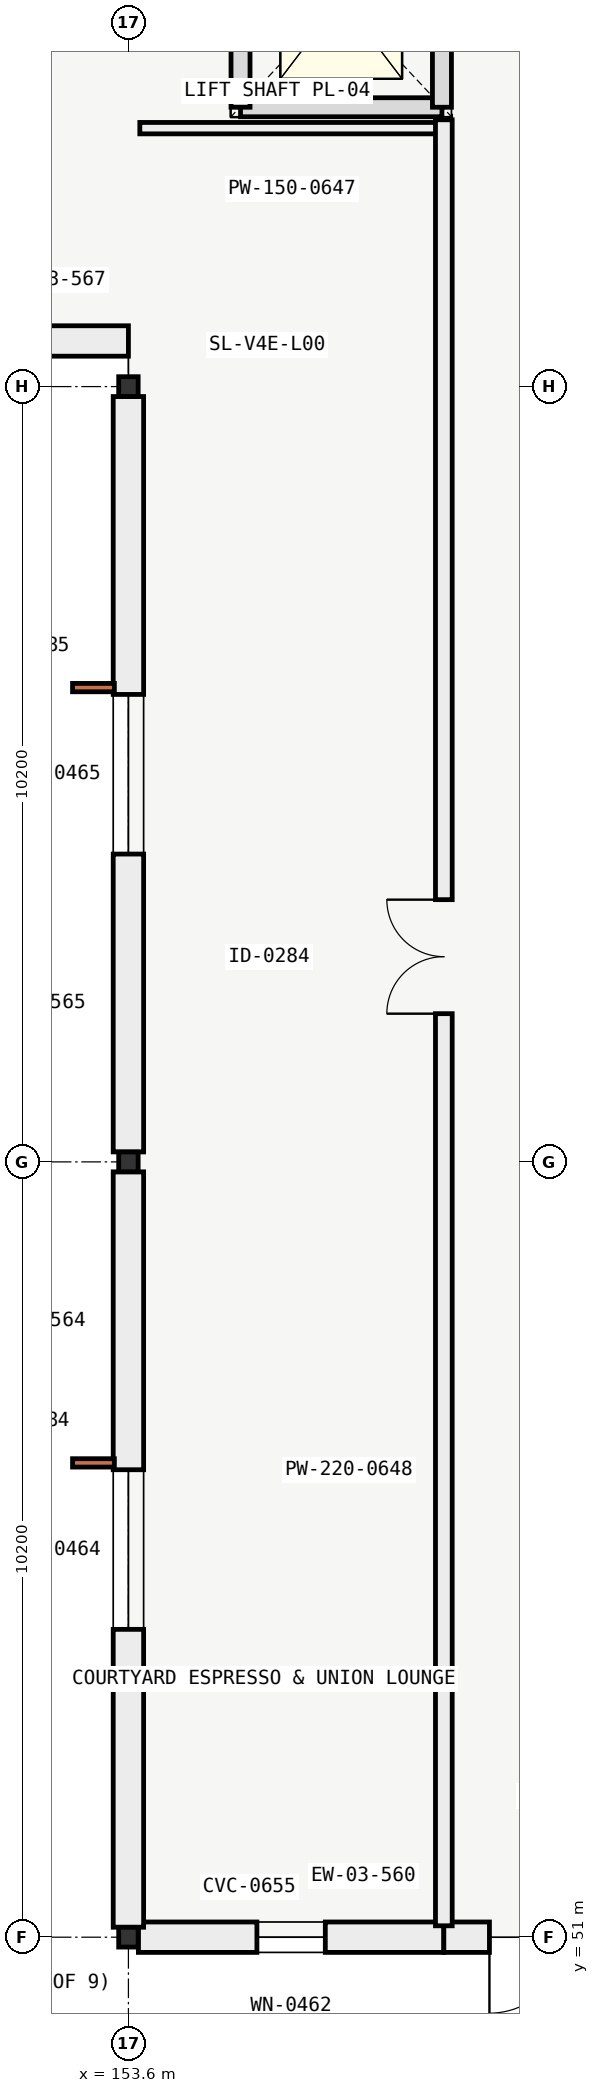
"""IFC4 building model, lengths in metres.
Left out: names, types, materials, properties, quantities, classifications, styles, units other than length and angle.
Written with IfcOpenShell. Run it as: python <this file> out.ifc"""

import sys

from ifc_helpers import new_model, si_unit, direction, frame, frame_2d, origin, origin_2d, place, context, subcontext, project, spatial, rectangle, i_section, extrude, element, fill, save


model = new_model("IFC4")
c1 = context("Model", 3, precision=1e-05, world=origin(), true_north=direction((0.0, 1.0)))
c2 = subcontext(c1, "Body", "Model", "MODEL_VIEW")
j1 = project(units=[si_unit("LENGTHUNIT", "METRE"), si_unit("PLANEANGLEUNIT", "RADIAN")], contexts=[c1])
p1 = place(None, origin())
s1 = spatial("IfcSite", under=j1, at=p1, CompositionType="ELEMENT")
p2 = place(p1, origin())
s2 = spatial("IfcBuilding", under=s1, at=p2, CompositionType="ELEMENT")
p3 = place(p2, origin())
s3 = spatial("IfcBuildingStorey", under=s2, at=p3, CompositionType="ELEMENT", Elevation=0.0)
for number, where, z_axis, x_axis in (
    (1, (153.6, 51.0, -0.4), (0.0, 0.0, 1.0), (1.0, 0.0, 0.0)),
    (2, (153.6, 61.2, -0.4), (0.0, 0.0, 1.0), (1.0, 0.0, 0.0)),
    (3, (153.6, 71.4, -0.4), (0.0, 0.0, 1.0), (1.0, 0.0, 0.0)),
):
    element("IfcColumn", number, at=place(p3, frame(where, z_axis=z_axis, x_axis=x_axis)), inside=s3, PredefinedType="COLUMN", context=c2, shape_type="SweptSolid", body=[
        extrude(i_section(OverallWidth=0.256, OverallDepth=0.26, WebThickness=0.01, FlangeThickness=0.017, FilletRadius=0.014, at=origin_2d()), origin(), (0.0, 0.0, 1.0), 5.8),
    ])
p4 = place(p3, frame((157.75, 51.0, 0.0), z_axis=(0.0, 0.0, 1.0), x_axis=(-1.0, 0.0, 0.0)))
e4 = element("IfcWall", 4, at=p4, inside=s3, PredefinedType="SOLIDWALL", context=c2, shape_type="SweptSolid", body=[
    extrude(rectangle(XDim=4.019, YDim=0.4, at=frame_2d((2.01, 0.0))), origin(), (0.0, 0.0, 1.0), 4.64),
])
p5 = place(p4, frame((1.56, 0.0, 0.85)))
e5 = element("IfcOpeningElement", 5, at=p5, cuts=e4, PredefinedType="OPENING", context=c2, shape_type="SweptSolid", body=[
    extrude(rectangle(XDim=0.9, YDim=2.2, at=frame_2d((0.45, 1.1))), frame((0.0, 0.21, 0.0), z_axis=(0.0, -1.0, 0.0), x_axis=(1.0, 0.0, 0.0)), (0.0, 0.0, 1.0), 0.42),
])
p6 = place(p3, frame((160.95, 51.0, 0.0), z_axis=(0.0, 0.0, 1.0), x_axis=(-1.0, 0.0, 0.0)))
e6 = element("IfcWall", 6, at=p6, inside=s3, PredefinedType="SOLIDWALL", context=c2, shape_type="SweptSolid", body=[
    extrude(rectangle(XDim=3.2, YDim=0.4, at=frame_2d((1.6, 0.0))), origin(), (0.0, 0.0, 1.0), 4.64),
])
p7 = place(p6, frame((0.6, 0.0, 0.0)))
e7 = element("IfcOpeningElement", 7, at=p7, cuts=e6, PredefinedType="OPENING", context=c2, shape_type="SweptSolid", body=[
    extrude(rectangle(XDim=2.0, YDim=2.4, at=frame_2d((1.0, 1.2))), frame((0.0, 0.21, 0.0), z_axis=(0.0, -1.0, 0.0), x_axis=(1.0, 0.0, 0.0)), (0.0, 0.0, 1.0), 0.42),
])
p8 = place(p3, frame((153.6, 51.131, 0.0), z_axis=(0.0, 0.0, 1.0), x_axis=(0.0, 1.0, 0.0)))
e8 = element("IfcWall", 8, at=p8, inside=s3, PredefinedType="SOLIDWALL", context=c2, shape_type="SweptSolid", body=[
    extrude(rectangle(XDim=9.938, YDim=0.4, at=frame_2d((4.969, 0.0))), origin(), (0.0, 0.0, 1.0), 4.694),
])
p9 = place(p8, frame((3.919, 0.0, 0.85)))
e9 = element("IfcOpeningElement", 9, at=p9, cuts=e8, PredefinedType="OPENING", context=c2, shape_type="SweptSolid", body=[
    extrude(rectangle(XDim=2.1, YDim=2.4, at=frame_2d((1.05, 1.2))), frame((0.0, 0.21, 0.0), z_axis=(0.0, -1.0, 0.0), x_axis=(1.0, 0.0, 0.0)), (0.0, 0.0, 1.0), 0.42),
])
p10 = place(p3, frame((153.6, 61.331, 0.0), z_axis=(0.0, 0.0, 1.0), x_axis=(0.0, 1.0, 0.0)))
e10 = element("IfcWall", 10, at=p10, inside=s3, PredefinedType="SOLIDWALL", context=c2, shape_type="SweptSolid", body=[
    extrude(rectangle(XDim=9.938, YDim=0.4, at=frame_2d((4.969, 0.0))), origin(), (0.0, 0.0, 1.0), 4.694),
])
p11 = place(p10, frame((3.919, 0.0, 0.85)))
e11 = element("IfcOpeningElement", 11, at=p11, cuts=e10, PredefinedType="OPENING", context=c2, shape_type="SweptSolid", body=[
    extrude(rectangle(XDim=2.1, YDim=2.4, at=frame_2d((1.05, 1.2))), frame((0.0, 0.21, 0.0), z_axis=(0.0, -1.0, 0.0), x_axis=(1.0, 0.0, 0.0)), (0.0, 0.0, 1.0), 0.42),
])
p12 = place(p3, frame((153.6, 72.0, 0.0), z_axis=(0.0, 0.0, 1.0), x_axis=(-1.0, 0.0, 0.0)))
e12 = element("IfcWall", 12, at=p12, inside=s3, PredefinedType="SOLIDWALL", context=c2, shape_type="SweptSolid", body=[
    extrude(rectangle(XDim=5.149, YDim=0.4, at=frame_2d((2.575, 0.0))), origin(), (0.0, 0.0, 1.0), 4.694),
])
p13 = place(p12, frame((1.975, 0.0, 0.9)))
e13 = element("IfcOpeningElement", 13, at=p13, cuts=e12, PredefinedType="OPENING", context=c2, shape_type="SweptSolid", body=[
    extrude(rectangle(XDim=1.2, YDim=1.8, at=frame_2d((0.6, 0.9))), frame((0.0, 0.21, 0.0), z_axis=(0.0, -1.0, 0.0), x_axis=(1.0, 0.0, 0.0)), (0.0, 0.0, 1.0), 0.42),
])
p14 = place(p3, frame((155.075, 75.075, -0.25), z_axis=(0.0, 0.0, 1.0), x_axis=(1.0, 0.0, 0.0)))
e14 = element("IfcWall", 14, at=p14, inside=s3, PredefinedType="SOLIDWALL", context=c2, shape_type="SweptSolid", body=[
    extrude(rectangle(XDim=2.65, YDim=0.25, at=frame_2d((1.325, 0.0))), origin(), (0.0, 0.0, 1.0), 5.37),
])
p15 = place(p3, frame((157.725, 75.075, -0.25), z_axis=(0.0, 0.0, 1.0), x_axis=(0.0, 1.0, 0.0)))
e15 = element("IfcWall", 15, at=p15, inside=s3, PredefinedType="SOLIDWALL", context=c2, shape_type="SweptSolid", body=[
    extrude(rectangle(XDim=2.85, YDim=0.25, at=frame_2d((1.425, 0.0))), origin(), (0.0, 0.0, 1.0), 5.37),
])
p16 = place(p15, frame((0.875, 0.0, 0.25)))
e16 = element("IfcOpeningElement", 16, at=p16, cuts=e15, PredefinedType="OPENING", context=c2, shape_type="SweptSolid", body=[
    extrude(rectangle(XDim=1.1, YDim=2.1, at=frame_2d((0.55, 1.05))), frame((0.0, 0.135, 0.0), z_axis=(0.0, -1.0, 0.0), x_axis=(1.0, 0.0, 0.0)), (0.0, 0.0, 1.0), 0.27),
])
p17 = place(p3, frame((155.075, 77.925, -0.25), z_axis=(0.0, 0.0, 1.0), x_axis=(0.0, -1.0, 0.0)))
e17 = element("IfcWall", 17, at=p17, inside=s3, PredefinedType="SOLIDWALL", context=c2, shape_type="SweptSolid", body=[
    extrude(rectangle(XDim=2.85, YDim=0.25, at=frame_2d((1.425, 0.0))), origin(), (0.0, 0.0, 1.0), 5.37),
])
p18 = place(p3, frame((153.75, 74.8, 0.0), z_axis=(0.0, 0.0, 1.0), x_axis=(1.0, 0.0, 0.0)))
e18 = element("IfcWall", 18, at=p18, inside=s3, PredefinedType="PARTITIONING", context=c2, shape_type="SweptSolid", body=[
    extrude(rectangle(XDim=4.0, YDim=0.15, at=frame_2d((2.0, 0.0))), origin(), (0.0, 0.0, 1.0), 5.05),
])
p19 = place(p3, frame((157.75, 51.15, 0.0), z_axis=(0.0, 0.0, 1.0), x_axis=(0.0, 1.0, 0.0)))
e19 = element("IfcWall", 19, at=p19, inside=s3, PredefinedType="PARTITIONING", context=c2, shape_type="SweptSolid", body=[
    extrude(rectangle(XDim=23.76, YDim=0.22, at=frame_2d((11.88, 0.0))), origin(), (0.0, 0.0, 1.0), 4.64),
])
p20 = place(p19, frame((12.0, 0.0, 0.0)))
e20 = element("IfcOpeningElement", 20, at=p20, cuts=e19, PredefinedType="OPENING", context=c2, shape_type="SweptSolid", body=[
    extrude(rectangle(XDim=1.5, YDim=2.2, at=frame_2d((0.75, 1.1))), frame((0.0, 0.12, 0.0), z_axis=(0.0, -1.0, 0.0), x_axis=(1.0, 0.0, 0.0)), (0.0, 0.0, 1.0), 0.24),
])
p21 = place(p5, origin())
e21 = element("IfcWindow", 21, at=p21, inside=s3, PartitioningType="SINGLE_PANEL", PredefinedType="WINDOW", context=c2, shape_type="SweptSolid", body=[
    extrude(rectangle(XDim=0.9, YDim=2.2, at=frame_2d((0.45, 1.1))), frame((0.0, 0.03, 0.0), z_axis=(0.0, -1.0, 0.0), x_axis=(1.0, 0.0, 0.0)), (0.0, 0.0, 1.0), 0.06),
])
fill(e5, e21)
p22 = place(p7, origin())
e22 = element("IfcDoor", 22, at=p22, inside=s3, OperationType="DOUBLE_DOOR_SINGLE_SWING", PredefinedType="DOOR", context=c2, shape_type="SweptSolid", body=[
    extrude(rectangle(XDim=2.0, YDim=2.4, at=frame_2d((1.0, 1.2))), frame((0.0, 0.025, 0.0), z_axis=(0.0, -1.0, 0.0), x_axis=(1.0, 0.0, 0.0)), (0.0, 0.0, 1.0), 0.05),
])
fill(e7, e22)
p23 = place(p9, origin())
e23 = element("IfcWindow", 23, at=p23, inside=s3, PartitioningType="SINGLE_PANEL", PredefinedType="WINDOW", context=c2, shape_type="SweptSolid", body=[
    extrude(rectangle(XDim=2.1, YDim=2.4, at=frame_2d((1.05, 1.2))), frame((0.0, 0.03, 0.0), z_axis=(0.0, -1.0, 0.0), x_axis=(1.0, 0.0, 0.0)), (0.0, 0.0, 1.0), 0.06),
])
fill(e9, e23)
p24 = place(p11, origin())
e24 = element("IfcWindow", 24, at=p24, inside=s3, PartitioningType="SINGLE_PANEL", PredefinedType="WINDOW", context=c2, shape_type="SweptSolid", body=[
    extrude(rectangle(XDim=2.1, YDim=2.4, at=frame_2d((1.05, 1.2))), frame((0.0, 0.03, 0.0), z_axis=(0.0, -1.0, 0.0), x_axis=(1.0, 0.0, 0.0)), (0.0, 0.0, 1.0), 0.06),
])
fill(e11, e24)
p25 = place(p20, origin())
e25 = element("IfcDoor", 25, at=p25, inside=s3, OperationType="DOUBLE_DOOR_SINGLE_SWING", PredefinedType="DOOR", context=c2, shape_type="SweptSolid", body=[
    extrude(rectangle(XDim=1.5, YDim=2.2, at=frame_2d((0.75, 1.1))), frame((0.0, 0.025, 0.0), z_axis=(0.0, -1.0, 0.0), x_axis=(1.0, 0.0, 0.0)), (0.0, 0.0, 1.0), 0.05),
])
fill(e20, e25)
save(model, sys.argv[1])
